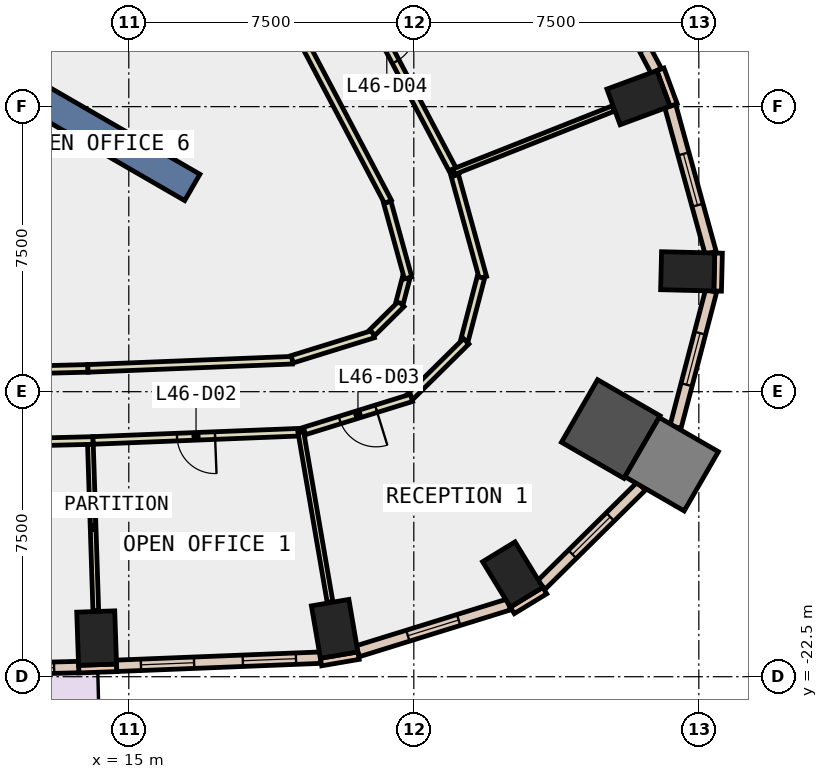
"""IFC4 building model, lengths in metres.
Left out: names, types, materials, properties, quantities, classifications, styles, units other than length and angle.
Written with IfcOpenShell. Run it as: python <this file> out.ifc"""

import sys

from ifc_helpers import new_model, si_unit, direction, frame, frame_2d, origin, origin_2d, place, context, subcontext, project, spatial, polyline, rectangle, outline, extrude, element, fill, save


model = new_model("IFC4")
c1 = context("Model", 3, precision=1e-05, world=origin(), true_north=direction((0.0, 1.0)))
c2 = subcontext(c1, "Body", "Model", "MODEL_VIEW")
j1 = project(units=[si_unit("LENGTHUNIT", "METRE"), si_unit("PLANEANGLEUNIT", "RADIAN")], contexts=[c1])
p1 = place(None, origin())
s1 = spatial("IfcSite", under=j1, at=p1, CompositionType="ELEMENT")
p2 = place(p1, origin())
s2 = spatial("IfcBuilding", under=s1, at=p2, CompositionType="ELEMENT")
p3 = place(p2, frame((0.0, 0.0, 206.6)))
s3 = spatial("IfcBuildingStorey", under=s2, at=p3, CompositionType="ELEMENT", Elevation=206.6)
for number, where, z_axis, x_axis in (
    (1, (14.154, -21.484, -0.4), (0.0, 0.0, 1.0), (0.999, 0.034, 0.0)),
    (2, (20.417, -21.241, -0.4), (0.0, 0.0, 1.0), (0.986, 0.169, 0.0)),
    (3, (25.102, -19.811, -0.4), (0.0, 0.0, 1.0), (0.853, 0.521, 0.0)),
):
    element("IfcColumn", number, at=place(p3, frame(where, z_axis=z_axis, x_axis=x_axis)), inside=s3, PredefinedType="COLUMN", context=c2, shape_type="SweptSolid", body=[
        extrude(rectangle(XDim=1.0, YDim=1.4, at=origin_2d()), origin(), (0.0, 0.0, 1.0), 4.2),
    ])
p4 = place(p3, frame((27.683, -15.983, -0.4), z_axis=(0.0, 0.0, 1.0), x_axis=(-0.866025403784, 0.5, 0.0)))
e4 = element("IfcColumn", 4, at=p4, inside=s3, PredefinedType="COLUMN", context=c2, shape_type="SweptSolid", body=[
    extrude(rectangle(XDim=1.9, YDim=1.9, at=origin_2d()), origin(), (0.0, 0.0, 1.0), 4.2),
])
for number, where, z_axis, x_axis in (
    (5, (29.707, -11.834, -0.4), (0.0, 0.0, 1.0), (0.025, 1.0, 0.0)),
    (6, (28.412, -7.264, -0.4), (0.0, 0.0, 1.0), (-0.347, 0.938, 0.0)),
):
    element("IfcColumn", number, at=place(p3, frame(where, z_axis=z_axis, x_axis=x_axis)), inside=s3, PredefinedType="COLUMN", context=c2, shape_type="SweptSolid", body=[
        extrude(rectangle(XDim=1.0, YDim=1.4, at=origin_2d()), origin(), (0.0, 0.0, 1.0), 4.2),
    ])
p5 = place(p3, frame((29.285, -16.908, -0.4), z_axis=(0.0, 0.0, 1.0), x_axis=(-0.866025403784, 0.5, 0.0)))
e7 = element("IfcColumn", 7, at=p5, inside=s3, PredefinedType="COLUMN", context=c2, shape_type="SweptSolid", body=[
    extrude(rectangle(XDim=1.8, YDim=1.8, at=origin_2d()), origin(), (0.0, 0.0, 1.0), 4.2),
])
p6 = place(p3, frame((0.0, 0.0, -0.4)))
e8 = element("IfcWall", 8, at=p6, inside=s3, PredefinedType="SHEAR", context=c2, shape_type="SweptSolid", body=[
    extrude(outline(polyline([(6.64, -9.0), (13.279, 2.5), (12.471, 2.5), (6.235, -8.3), (6.64, -9.0)])), origin(), (0.0, 0.0, 1.0), 4.2),
])
p7 = place(p3, frame((8.877, -5.125, -0.4), z_axis=(0.0, 0.0, 1.0), x_axis=(0.866017533419, -0.500013631625, 0.0)))
e9 = element("IfcWall", 9, at=p7, inside=s3, PredefinedType="SHEAR", context=c2, shape_type="SweptSolid", body=[
    extrude(rectangle(XDim=9.0, YDim=0.8, at=frame_2d((4.5, 0.0))), origin(), (0.0, 0.0, 1.0), 4.2),
])
p8 = place(p3, frame((29.336, -7.456, 0.0), z_axis=(0.0, 0.0, 1.0), x_axis=(-0.346892928577, 0.937904737222, 0.0)))
e10 = element("IfcWall", 10, at=p8, inside=s3, PredefinedType="STANDARD", context=c2, shape_type="SweptSolid", body=[
    extrude(rectangle(XDim=1.0, YDim=0.2, at=frame_2d((0.5, 0.0))), origin(), (0.0, 0.0, 1.0), 3.8),
])
p9 = place(p3, frame((13.682, -22.3, 0.0), z_axis=(0.0, 0.0, 1.0), x_axis=(0.999423561854, 0.033949138587, 0.0)))
e11 = element("IfcWall", 11, at=p9, inside=s3, PredefinedType="STANDARD", context=c2, shape_type="SweptSolid", body=[
    extrude(rectangle(XDim=1.0, YDim=0.2, at=frame_2d((0.5, 0.0))), origin(), (0.0, 0.0, 1.0), 3.8),
])
p10 = place(p3, frame((20.059, -22.114, 0.0), z_axis=(0.0, 0.0, 1.0), x_axis=(0.985631544579, 0.168909615862, 0.0)))
e12 = element("IfcWall", 12, at=p10, inside=s3, PredefinedType="STANDARD", context=c2, shape_type="SweptSolid", body=[
    extrude(rectangle(XDim=1.0, YDim=0.2, at=frame_2d((0.5, 0.0))), origin(), (0.0, 0.0, 1.0), 3.8),
])
p11 = place(p3, frame((25.092, -20.754, 0.0), z_axis=(0.0, 0.0, 1.0), x_axis=(0.853679739553, 0.520798331677, 0.0)))
e13 = element("IfcWall", 13, at=p11, inside=s3, PredefinedType="STANDARD", context=c2, shape_type="SweptSolid", body=[
    extrude(rectangle(XDim=1.0, YDim=0.2, at=frame_2d((0.5, 0.0))), origin(), (0.0, 0.0, 1.0), 3.8),
])
p12 = place(p3, frame((30.495, -12.353, 0.0), z_axis=(0.0, 0.0, 1.0), x_axis=(0.023942303888, 0.999713341956, 0.0)))
e14 = element("IfcWall", 14, at=p12, inside=s3, PredefinedType="STANDARD", context=c2, shape_type="SweptSolid", body=[
    extrude(rectangle(XDim=0.999, YDim=0.2, at=frame_2d((0.5, 0.0))), origin(), (0.0, 0.0, 1.0), 3.8),
])
p13 = place(p3, frame((8.297, -22.381, 0.0), z_axis=(0.0, 0.0, 1.0), x_axis=(0.999685717988, 0.025069209235, 0.0)))
e15 = element("IfcWall", 15, at=p13, inside=s3, PredefinedType="STANDARD", context=c2, shape_type="SweptSolid", body=[
    extrude(rectangle(XDim=5.385, YDim=0.3, at=frame_2d((2.693, 0.0))), origin(), (0.0, 0.0, 1.0), 3.8),
])
p14 = place(p13, frame((0.346, 0.0, 0.0)))
e16 = element("IfcOpeningElement", 16, at=p14, cuts=e15, PredefinedType="OPENING", context=c2, shape_type="SweptSolid", body=[
    extrude(rectangle(XDim=2.0, YDim=2.4, at=frame_2d((1.0, 1.2))), frame((0.0, 0.16, 0.0), z_axis=(0.0, -1.0, 0.0), x_axis=(1.0, 0.0, 0.0)), (0.0, 0.0, 1.0), 0.32),
])
p15 = place(p13, frame((3.339, 0.0, 0.9)))
e17 = element("IfcOpeningElement", 17, at=p15, cuts=e15, PredefinedType="OPENING", context=c2, shape_type="SweptSolid", body=[
    extrude(rectangle(XDim=1.4, YDim=2.6, at=frame_2d((0.7, 1.3))), frame((0.0, 0.16, 0.0), z_axis=(0.0, -1.0, 0.0), x_axis=(1.0, 0.0, 0.0)), (0.0, 0.0, 1.0), 0.32),
])
p16 = place(p3, frame((14.679, -22.213, 0.0), z_axis=(0.0, 0.0, 1.0), x_axis=(0.999205241612, 0.039860822062, 0.0)))
e18 = element("IfcWall", 18, at=p16, inside=s3, PredefinedType="STANDARD", context=c2, shape_type="SweptSolid", body=[
    extrude(rectangle(XDim=5.365, YDim=0.3, at=frame_2d((2.683, 0.0))), origin(), (0.0, 0.0, 1.0), 3.8),
])
p17 = place(p16, frame((0.641, 0.0, 0.9)))
e19 = element("IfcOpeningElement", 19, at=p17, cuts=e18, PredefinedType="OPENING", context=c2, shape_type="SweptSolid", body=[
    extrude(rectangle(XDim=1.4, YDim=2.6, at=frame_2d((0.7, 1.3))), frame((0.0, 0.16, 0.0), z_axis=(0.0, -1.0, 0.0), x_axis=(1.0, 0.0, 0.0)), (0.0, 0.0, 1.0), 0.32),
])
p18 = place(p16, frame((3.324, 0.0, 0.9)))
e20 = element("IfcOpeningElement", 20, at=p18, cuts=e18, PredefinedType="OPENING", context=c2, shape_type="SweptSolid", body=[
    extrude(rectangle(XDim=1.4, YDim=2.6, at=frame_2d((0.7, 1.3))), frame((0.0, 0.16, 0.0), z_axis=(0.0, -1.0, 0.0), x_axis=(1.0, 0.0, 0.0)), (0.0, 0.0, 1.0), 0.32),
])
p19 = place(p3, frame((21.024, -21.83, 0.0), z_axis=(0.0, 0.0, 1.0), x_axis=(0.955247215067, 0.295808651171, 0.0)))
e21 = element("IfcWall", 21, at=p19, inside=s3, PredefinedType="STANDARD", context=c2, shape_type="SweptSolid", body=[
    extrude(rectangle(XDim=4.161, YDim=0.3, at=frame_2d((2.081, 0.0))), origin(), (0.0, 0.0, 1.0), 3.8),
])
p20 = place(p19, frame((1.381, 0.0, 0.9)))
e22 = element("IfcOpeningElement", 22, at=p20, cuts=e21, PredefinedType="OPENING", context=c2, shape_type="SweptSolid", body=[
    extrude(rectangle(XDim=1.4, YDim=2.6, at=frame_2d((0.7, 1.3))), frame((0.0, 0.16, 0.0), z_axis=(0.0, -1.0, 0.0), x_axis=(1.0, 0.0, 0.0)), (0.0, 0.0, 1.0), 0.32),
])
p21 = place(p3, frame((25.855, -20.087, 0.0), z_axis=(0.0, 0.0, 1.0), x_axis=(0.711316812334, 0.702871533419, 0.0)))
e23 = element("IfcWall", 23, at=p21, inside=s3, PredefinedType="STANDARD", context=c2, shape_type="SweptSolid", body=[
    extrude(rectangle(XDim=3.7, YDim=0.3, at=frame_2d((1.85, 0.0))), origin(), (0.0, 0.0, 1.0), 3.8),
])
p22 = place(p21, frame((1.15, 0.0, 0.9)))
e24 = element("IfcOpeningElement", 24, at=p22, cuts=e23, PredefinedType="OPENING", context=c2, shape_type="SweptSolid", body=[
    extrude(rectangle(XDim=1.4, YDim=2.6, at=frame_2d((0.7, 1.3))), frame((0.0, 0.16, 0.0), z_axis=(0.0, -1.0, 0.0), x_axis=(1.0, 0.0, 0.0)), (0.0, 0.0, 1.0), 0.32),
])
p23 = place(p3, frame((29.386, -15.928, 0.0), z_axis=(0.0, 0.0, 1.0), x_axis=(0.253200635583, 0.96741378848, 0.0)))
e25 = element("IfcWall", 25, at=p23, inside=s3, PredefinedType="STANDARD", context=c2, shape_type="SweptSolid", body=[
    extrude(rectangle(XDim=3.701, YDim=0.3, at=frame_2d((1.85, 0.0))), origin(), (0.0, 0.0, 1.0), 3.8),
])
p24 = place(p23, frame((1.15, 0.0, 0.9)))
e26 = element("IfcOpeningElement", 26, at=p24, cuts=e25, PredefinedType="OPENING", context=c2, shape_type="SweptSolid", body=[
    extrude(rectangle(XDim=1.4, YDim=2.6, at=frame_2d((0.7, 1.3))), frame((0.0, 0.16, 0.0), z_axis=(0.0, -1.0, 0.0), x_axis=(1.0, 0.0, 0.0)), (0.0, 0.0, 1.0), 0.32),
])
p25 = place(p3, frame((30.312, -11.35, 0.0), z_axis=(0.0, 0.0, 1.0), x_axis=(-0.265534577923, 0.96410133696, 0.0)))
e27 = element("IfcWall", 27, at=p25, inside=s3, PredefinedType="STANDARD", context=c2, shape_type="SweptSolid", body=[
    extrude(rectangle(XDim=4.007, YDim=0.3, at=frame_2d((2.003, 0.0))), origin(), (0.0, 0.0, 1.0), 3.8),
])
p26 = place(p25, frame((1.303, 0.0, 0.9)))
e28 = element("IfcOpeningElement", 28, at=p26, cuts=e27, PredefinedType="OPENING", context=c2, shape_type="SweptSolid", body=[
    extrude(rectangle(XDim=1.4, YDim=2.6, at=frame_2d((0.7, 1.3))), frame((0.0, 0.16, 0.0), z_axis=(0.0, -1.0, 0.0), x_axis=(1.0, 0.0, 0.0)), (0.0, 0.0, 1.0), 0.32),
])
p27 = place(p3, frame((28.879, -6.559, 0.0), z_axis=(0.0, 0.0, 1.0), x_axis=(-0.466789249342, 0.884368586449, 0.0)))
e29 = element("IfcWall", 29, at=p27, inside=s3, PredefinedType="STANDARD", context=c2, shape_type="SweptSolid", body=[
    extrude(rectangle(XDim=7.273, YDim=0.3, at=frame_2d((3.637, 0.0))), origin(), (0.0, 0.0, 1.0), 3.8),
])
p28 = place(p27, frame((0.618, 0.0, 0.9)))
e30 = element("IfcOpeningElement", 30, at=p28, cuts=e29, PredefinedType="OPENING", context=c2, shape_type="SweptSolid", body=[
    extrude(rectangle(XDim=2.4, YDim=2.6, at=frame_2d((1.2, 1.3))), frame((0.0, 0.16, 0.0), z_axis=(0.0, -1.0, 0.0), x_axis=(1.0, 0.0, 0.0)), (0.0, 0.0, 1.0), 0.32),
])
p29 = place(p27, frame((4.255, 0.0, 0.9)))
e31 = element("IfcOpeningElement", 31, at=p29, cuts=e29, PredefinedType="OPENING", context=c2, shape_type="SweptSolid", body=[
    extrude(rectangle(XDim=2.4, YDim=2.6, at=frame_2d((1.2, 1.3))), frame((0.0, 0.16, 0.0), z_axis=(0.0, -1.0, 0.0), x_axis=(1.0, 0.0, 0.0)), (0.0, 0.0, 1.0), 0.32),
])
p30 = place(p3, frame((7.7, -14.544, 0.0), z_axis=(0.0, 0.0, 1.0), x_axis=(0.99968218628, 0.025209649611, 0.0)))
e32 = element("IfcWall", 32, at=p30, inside=s3, PredefinedType="PARTITIONING", context=c2, shape_type="SweptSolid", body=[
    extrude(rectangle(XDim=6.227, YDim=0.2, at=frame_2d((3.114, 0.0))), origin(), (0.0, 0.0, 1.0), 3.8),
])
p31 = place(p3, frame((13.925, -14.387, 0.0), z_axis=(0.0, 0.0, 1.0), x_axis=(0.999202986342, 0.039917315597, 0.0)))
e33 = element("IfcWall", 33, at=p31, inside=s3, PredefinedType="PARTITIONING", context=c2, shape_type="SweptSolid", body=[
    extrude(rectangle(XDim=5.382, YDim=0.2, at=frame_2d((2.691, 0.0))), origin(), (0.0, 0.0, 1.0), 3.8),
])
p32 = place(p3, frame((19.299, -14.147, 0.0), z_axis=(0.0, 0.0, 1.0), x_axis=(0.955241047187, 0.295828568211, 0.0)))
e34 = element("IfcWall", 34, at=p32, inside=s3, PredefinedType="PARTITIONING", context=c2, shape_type="SweptSolid", body=[
    extrude(rectangle(XDim=2.234, YDim=0.2, at=frame_2d((1.117, 0.0))), origin(), (0.0, 0.0, 1.0), 3.8),
])
p33 = place(p3, frame((21.408, -13.445, 0.0), z_axis=(0.0, 0.0, 1.0), x_axis=(0.711298443117, 0.702890122863, 0.0)))
e35 = element("IfcWall", 35, at=p33, inside=s3, PredefinedType="PARTITIONING", context=c2, shape_type="SweptSolid", body=[
    extrude(rectangle(XDim=1.074, YDim=0.2, at=frame_2d((0.537, 0.0))), origin(), (0.0, 0.0, 1.0), 3.8),
])
p34 = place(p3, frame((22.126, -12.664, 0.0), z_axis=(0.0, 0.0, 1.0), x_axis=(0.253079435581, 0.967445501972, 0.0)))
e36 = element("IfcWall", 36, at=p34, inside=s3, PredefinedType="PARTITIONING", context=c2, shape_type="SweptSolid", body=[
    extrude(rectangle(XDim=0.68, YDim=0.2, at=frame_2d((0.34, 0.0))), origin(), (0.0, 0.0, 1.0), 3.8),
])
p35 = place(p3, frame((22.35, -12.006, 0.0), z_axis=(0.0, 0.0, 1.0), x_axis=(-0.265584627827, 0.964087550725, 0.0)))
e37 = element("IfcWall", 37, at=p35, inside=s3, PredefinedType="PARTITIONING", context=c2, shape_type="SweptSolid", body=[
    extrude(rectangle(XDim=2.067, YDim=0.2, at=frame_2d((1.034, 0.0))), origin(), (0.0, 0.0, 1.0), 3.8),
])
p36 = place(p3, frame((21.821, -10.005, 0.0), z_axis=(0.0, 0.0, 1.0), x_axis=(-0.466770012358, 0.884378739887, 0.0)))
e38 = element("IfcWall", 38, at=p36, inside=s3, PredefinedType="PARTITIONING", context=c2, shape_type="SweptSolid", body=[
    extrude(rectangle(XDim=7.449, YDim=0.2, at=frame_2d((3.725, 0.0))), origin(), (0.0, 0.0, 1.0), 3.8),
])
p37 = place(p3, frame((14.061, -16.284, 0.0), z_axis=(0.0, 0.0, 1.0), x_axis=(-0.999679323762, -0.025322907453, 0.0)))
e39 = element("IfcWall", 39, at=p37, inside=s3, PredefinedType="PARTITIONING", context=c2, shape_type="SweptSolid", body=[
    extrude(rectangle(XDim=6.363, YDim=0.2, at=frame_2d((3.182, 0.0))), origin(), (0.0, 0.0, 1.0), 3.8),
])
p38 = place(p37, frame((2.682, 0.0, 0.0)))
e40 = element("IfcOpeningElement", 40, at=p38, cuts=e39, PredefinedType="OPENING", context=c2, shape_type="SweptSolid", body=[
    extrude(rectangle(XDim=1.0, YDim=2.1, at=frame_2d((0.5, 1.05))), frame((0.0, 0.11, 0.0), z_axis=(0.0, -1.0, 0.0), x_axis=(1.0, 0.0, 0.0)), (0.0, 0.0, 1.0), 0.22),
])
p39 = place(p3, frame((19.627, -16.061, 0.0), z_axis=(0.0, 0.0, 1.0), x_axis=(-0.999206061563, -0.039840262741, 0.0)))
e41 = element("IfcWall", 41, at=p39, inside=s3, PredefinedType="PARTITIONING", context=c2, shape_type="SweptSolid", body=[
    extrude(rectangle(XDim=5.57, YDim=0.2, at=frame_2d((2.785, 0.0))), origin(), (0.0, 0.0, 1.0), 3.8),
])
p40 = place(p39, frame((2.36, 0.0, 0.0)))
e42 = element("IfcOpeningElement", 42, at=p40, cuts=e41, PredefinedType="OPENING", context=c2, shape_type="SweptSolid", body=[
    extrude(rectangle(XDim=1.0, YDim=2.1, at=frame_2d((0.5, 1.05))), frame((0.0, 0.11, 0.0), z_axis=(0.0, -1.0, 0.0), x_axis=(1.0, 0.0, 0.0)), (0.0, 0.0, 1.0), 0.22),
])
p41 = place(p3, frame((23.578, -9.309, 0.0), z_axis=(0.0, 0.0, 1.0), x_axis=(0.265884037198, -0.964005020092, 0.0)))
e43 = element("IfcWall", 43, at=p41, inside=s3, PredefinedType="PARTITIONING", context=c2, shape_type="SweptSolid", body=[
    extrude(rectangle(XDim=2.784, YDim=0.2, at=frame_2d((1.392, 0.0))), origin(), (0.0, 0.0, 1.0), 3.8),
])
p42 = place(p3, frame((24.266, -11.993, 0.0), z_axis=(0.0, 0.0, 1.0), x_axis=(-0.253025690571, -0.967459559832, 0.0)))
e44 = element("IfcWall", 44, at=p42, inside=s3, PredefinedType="PARTITIONING", context=c2, shape_type="SweptSolid", body=[
    extrude(rectangle(XDim=1.712, YDim=0.2, at=frame_2d((0.856, 0.0))), origin(), (0.0, 0.0, 1.0), 3.8),
])
p43 = place(p3, frame((23.878, -13.675, 0.0), z_axis=(0.0, 0.0, 1.0), x_axis=(-0.710949827962, -0.703242733429, 0.0)))
e45 = element("IfcWall", 45, at=p43, inside=s3, PredefinedType="PARTITIONING", context=c2, shape_type="SweptSolid", body=[
    extrude(rectangle(XDim=2.059, YDim=0.2, at=frame_2d((1.03, 0.0))), origin(), (0.0, 0.0, 1.0), 3.8),
])
p44 = place(p3, frame((22.438, -15.163, 0.0), z_axis=(0.0, 0.0, 1.0), x_axis=(-0.955234616163, -0.295849333419, 0.0)))
e46 = element("IfcWall", 46, at=p44, inside=s3, PredefinedType="PARTITIONING", context=c2, shape_type="SweptSolid", body=[
    extrude(rectangle(XDim=2.947, YDim=0.2, at=frame_2d((1.473, 0.0))), origin(), (0.0, 0.0, 1.0), 3.8),
])
p45 = place(p44, frame((0.974, 0.0, 0.0)))
e47 = element("IfcOpeningElement", 47, at=p45, cuts=e46, PredefinedType="OPENING", context=c2, shape_type="SweptSolid", body=[
    extrude(rectangle(XDim=1.0, YDim=2.1, at=frame_2d((0.5, 1.05))), frame((0.0, 0.11, 0.0), z_axis=(0.0, -1.0, 0.0), x_axis=(1.0, 0.0, 0.0)), (0.0, 0.0, 1.0), 0.22),
])
p46 = place(p3, frame((19.98, -2.448, 0.0), z_axis=(0.0, 0.0, 1.0), x_axis=(0.466864023915, -0.884329114738, 0.0)))
e48 = element("IfcWall", 48, at=p46, inside=s3, PredefinedType="PARTITIONING", context=c2, shape_type="SweptSolid", body=[
    extrude(rectangle(XDim=7.75, YDim=0.2, at=frame_2d((3.875, 0.0))), origin(), (0.0, 0.0, 1.0), 3.8),
])
p47 = place(p46, frame((3.375, 0.0, 0.0)))
e49 = element("IfcOpeningElement", 49, at=p47, cuts=e48, PredefinedType="OPENING", context=c2, shape_type="SweptSolid", body=[
    extrude(rectangle(XDim=1.0, YDim=2.1, at=frame_2d((0.5, 1.05))), frame((0.0, 0.11, 0.0), z_axis=(0.0, -1.0, 0.0), x_axis=(1.0, 0.0, 0.0)), (0.0, 0.0, 1.0), 0.22),
])
p48 = place(p3, frame((13.99, -16.386, 0.0), z_axis=(0.0, 0.0, 1.0), x_axis=(0.032438863816, -0.999473721573, 0.0)))
e50 = element("IfcWall", 50, at=p48, inside=s3, PredefinedType="PARTITIONING", context=c2, shape_type="SweptSolid", body=[
    extrude(rectangle(XDim=4.38, YDim=0.15, at=frame_2d((2.19, 0.0))), origin(), (0.0, 0.0, 1.0), 3.8),
])
p49 = place(p3, frame((19.527, -16.065, 0.0), z_axis=(0.0, 0.0, 1.0), x_axis=(0.169437821314, -0.985540879268, 0.0)))
e51 = element("IfcWall", 51, at=p49, inside=s3, PredefinedType="PARTITIONING", context=c2, shape_type="SweptSolid", body=[
    extrude(rectangle(XDim=4.531, YDim=0.15, at=frame_2d((2.266, 0.0))), origin(), (0.0, 0.0, 1.0), 3.8),
])
p50 = place(p3, frame((23.552, -9.212, 0.0), z_axis=(0.0, 0.0, 1.0), x_axis=(0.929720624715, 0.368265610639, 0.0)))
e52 = element("IfcWall", 52, at=p50, inside=s3, PredefinedType="PARTITIONING", context=c2, shape_type="SweptSolid", body=[
    extrude(rectangle(XDim=4.515, YDim=0.15, at=frame_2d((2.258, 0.0))), origin(), (0.0, 0.0, 1.0), 3.8),
])
p51 = place(p15, origin())
e53 = element("IfcWindow", 53, at=p51, inside=s3, PartitioningType="SINGLE_PANEL", PredefinedType="WINDOW", context=c2, shape_type="SweptSolid", body=[
    extrude(rectangle(XDim=1.4, YDim=2.6, at=frame_2d((0.7, 1.3))), frame((0.0, 0.03, 0.0), z_axis=(0.0, -1.0, 0.0), x_axis=(1.0, 0.0, 0.0)), (0.0, 0.0, 1.0), 0.06),
])
fill(e17, e53)
p52 = place(p17, origin())
e54 = element("IfcWindow", 54, at=p52, inside=s3, PartitioningType="SINGLE_PANEL", PredefinedType="WINDOW", context=c2, shape_type="SweptSolid", body=[
    extrude(rectangle(XDim=1.4, YDim=2.6, at=frame_2d((0.7, 1.3))), frame((0.0, 0.03, 0.0), z_axis=(0.0, -1.0, 0.0), x_axis=(1.0, 0.0, 0.0)), (0.0, 0.0, 1.0), 0.06),
])
fill(e19, e54)
p53 = place(p18, origin())
e55 = element("IfcWindow", 55, at=p53, inside=s3, PartitioningType="SINGLE_PANEL", PredefinedType="WINDOW", context=c2, shape_type="SweptSolid", body=[
    extrude(rectangle(XDim=1.4, YDim=2.6, at=frame_2d((0.7, 1.3))), frame((0.0, 0.03, 0.0), z_axis=(0.0, -1.0, 0.0), x_axis=(1.0, 0.0, 0.0)), (0.0, 0.0, 1.0), 0.06),
])
fill(e20, e55)
p54 = place(p20, origin())
e56 = element("IfcWindow", 56, at=p54, inside=s3, PartitioningType="SINGLE_PANEL", PredefinedType="WINDOW", context=c2, shape_type="SweptSolid", body=[
    extrude(rectangle(XDim=1.4, YDim=2.6, at=frame_2d((0.7, 1.3))), frame((0.0, 0.03, 0.0), z_axis=(0.0, -1.0, 0.0), x_axis=(1.0, 0.0, 0.0)), (0.0, 0.0, 1.0), 0.06),
])
fill(e22, e56)
p55 = place(p22, origin())
e57 = element("IfcWindow", 57, at=p55, inside=s3, PartitioningType="SINGLE_PANEL", PredefinedType="WINDOW", context=c2, shape_type="SweptSolid", body=[
    extrude(rectangle(XDim=1.4, YDim=2.6, at=frame_2d((0.7, 1.3))), frame((0.0, 0.03, 0.0), z_axis=(0.0, -1.0, 0.0), x_axis=(1.0, 0.0, 0.0)), (0.0, 0.0, 1.0), 0.06),
])
fill(e24, e57)
p56 = place(p24, origin())
e58 = element("IfcWindow", 58, at=p56, inside=s3, PartitioningType="SINGLE_PANEL", PredefinedType="WINDOW", context=c2, shape_type="SweptSolid", body=[
    extrude(rectangle(XDim=1.4, YDim=2.6, at=frame_2d((0.7, 1.3))), frame((0.0, 0.03, 0.0), z_axis=(0.0, -1.0, 0.0), x_axis=(1.0, 0.0, 0.0)), (0.0, 0.0, 1.0), 0.06),
])
fill(e26, e58)
p57 = place(p26, origin())
e59 = element("IfcWindow", 59, at=p57, inside=s3, PartitioningType="SINGLE_PANEL", PredefinedType="WINDOW", context=c2, shape_type="SweptSolid", body=[
    extrude(rectangle(XDim=1.4, YDim=2.6, at=frame_2d((0.7, 1.3))), frame((0.0, 0.03, 0.0), z_axis=(0.0, -1.0, 0.0), x_axis=(1.0, 0.0, 0.0)), (0.0, 0.0, 1.0), 0.06),
])
fill(e28, e59)
p58 = place(p40, origin())
e60 = element("IfcDoor", 60, at=p58, inside=s3, OperationType="SINGLE_SWING_LEFT", PredefinedType="DOOR", context=c2, shape_type="SweptSolid", body=[
    extrude(rectangle(XDim=1.0, YDim=2.1, at=frame_2d((0.5, 1.05))), frame((0.0, 0.025, 0.0), z_axis=(0.0, -1.0, 0.0), x_axis=(1.0, 0.0, 0.0)), (0.0, 0.0, 1.0), 0.05),
])
fill(e42, e60)
p59 = place(p45, origin())
e61 = element("IfcDoor", 61, at=p59, inside=s3, OperationType="SINGLE_SWING_LEFT", PredefinedType="DOOR", context=c2, shape_type="SweptSolid", body=[
    extrude(rectangle(XDim=1.0, YDim=2.1, at=frame_2d((0.5, 1.05))), frame((0.0, 0.025, 0.0), z_axis=(0.0, -1.0, 0.0), x_axis=(1.0, 0.0, 0.0)), (0.0, 0.0, 1.0), 0.05),
])
fill(e47, e61)
p60 = place(p47, origin())
e62 = element("IfcDoor", 62, at=p60, inside=s3, OperationType="SINGLE_SWING_LEFT", PredefinedType="DOOR", context=c2, shape_type="SweptSolid", body=[
    extrude(rectangle(XDim=1.0, YDim=2.1, at=frame_2d((0.5, 1.05))), frame((0.0, 0.025, 0.0), z_axis=(0.0, -1.0, 0.0), x_axis=(1.0, 0.0, 0.0)), (0.0, 0.0, 1.0), 0.05),
])
fill(e49, e62)
save(model, sys.argv[1])
